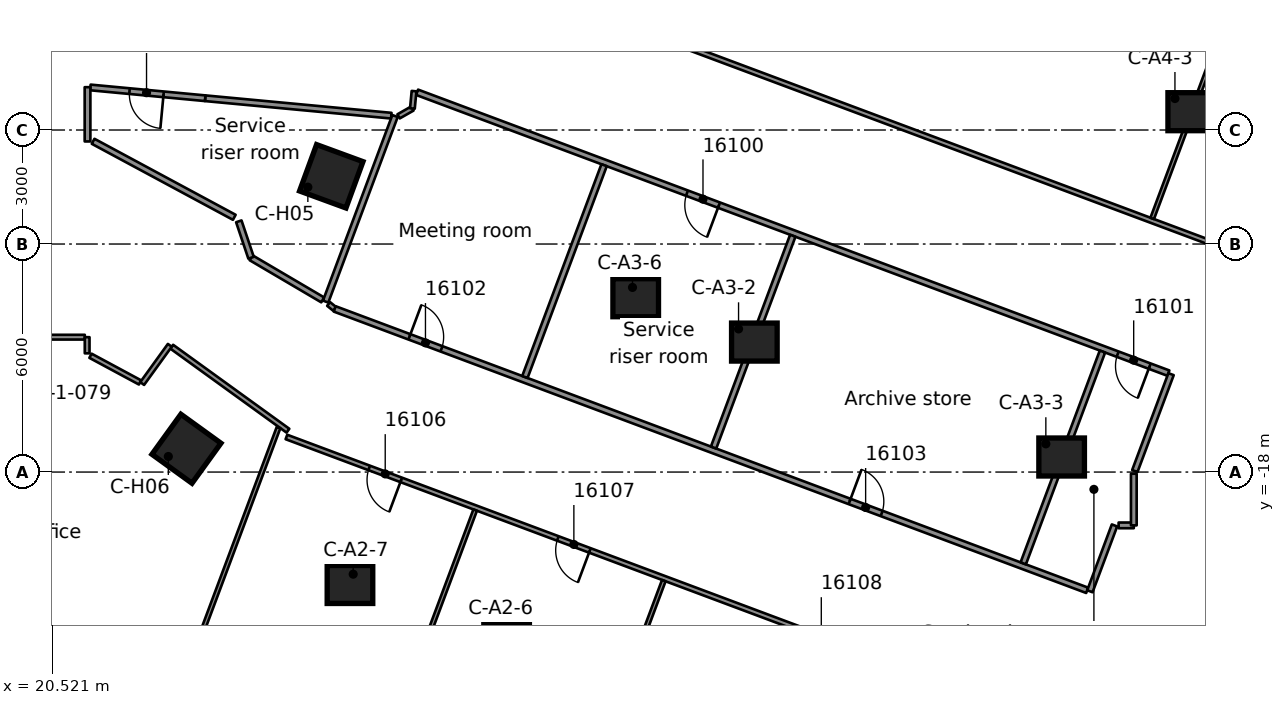
"""IFC4 building model, lengths in metres.
Left out: names, types, materials, properties, quantities, classifications, styles, units other than length and angle.
Written with IfcOpenShell. Run it as: python <this file> out.ifc"""

import sys

from ifc_helpers import new_model, si_unit, direction, frame, frame_2d, origin, origin_2d, place, context, subcontext, project, spatial, rectangle, extrude, element, fill, save


model = new_model("IFC4")
c1 = context("Model", 3, precision=1e-05, world=origin(), true_north=direction((0.0, 1.0)))
c2 = subcontext(c1, "Body", "Model", "MODEL_VIEW")
j1 = project(units=[si_unit("LENGTHUNIT", "METRE"), si_unit("PLANEANGLEUNIT", "RADIAN")], contexts=[c1])
p1 = place(None, origin())
s1 = spatial("IfcSite", under=j1, at=p1, CompositionType="ELEMENT")
p2 = place(p1, origin())
s2 = spatial("IfcBuilding", under=s1, at=p2, CompositionType="ELEMENT")
p3 = place(p2, frame((0.0, 0.0, 80.7)))
s3 = spatial("IfcBuildingStorey", under=s2, at=p3, CompositionType="ELEMENT", Elevation=80.7)
for number, where, z_axis, x_axis in (
    (1, (32.478, -22.499, 0.0), (0.0, 0.0, 1.0), (1.0, 0.0, 0.0)),
    (2, (28.356, -20.958, 0.0), (0.0, 0.0, 1.0), (1.0, 0.0, 0.0)),
    (3, (38.997, -14.58, 0.0), (0.0, 0.0, 1.0), (1.0, 0.0, 0.0)),
    (4, (47.083, -17.604, 0.0), (0.0, 0.0, 1.0), (1.0, 0.0, 0.0)),
    (5, (35.875, -13.413, 0.0), (0.0, 0.0, 1.0), (1.0, 0.0, 0.0)),
    (6, (50.48, -8.518, 0.0), (0.0, 0.0, 1.0), (1.0, 0.0, 0.0)),
):
    element("IfcColumn", number, at=place(p3, frame(where, z_axis=z_axis, x_axis=x_axis)), inside=s3, PredefinedType="COLUMN", context=c2, shape_type="SweptSolid", body=[
        extrude(rectangle(XDim=1.2, YDim=1.0, at=origin_2d()), origin(), (0.0, 0.0, 1.0), 3.5),
    ])
for number, where, z_axis, x_axis in (
    (7, (27.864, -10.218, 0.0), (0.0, 0.0, 1.0), (0.939, -0.344, 0.0)),
    (8, (24.053, -17.387, 0.0), (0.0, 0.0, 1.0), (0.81, -0.586, 0.0)),
):
    element("IfcColumn", number, at=place(p3, frame(where, z_axis=z_axis, x_axis=x_axis)), inside=s3, PredefinedType="COLUMN", context=c2, shape_type="SweptSolid", body=[
        extrude(rectangle(XDim=1.3, YDim=1.3, at=origin_2d()), origin(), (0.0, 0.0, 1.0), 3.5),
    ])
p4 = place(p3, frame((27.794, -13.578, 0.0), z_axis=(0.0, 0.0, 1.0), x_axis=(0.778431743949, -0.627729256935, 0.0)))
e9 = element("IfcWall", 9, at=p4, inside=s3, PredefinedType="PARTITIONING", context=c2, shape_type="SweptSolid", body=[
    extrude(rectangle(XDim=0.206, YDim=0.125, at=frame_2d((0.103, 0.0))), origin(), (0.0, 0.0, 1.0), 3.08),
])
p5 = place(p3, frame((27.639, -13.47, 0.0), z_axis=(0.0, 0.0, 1.0), x_axis=(-0.862037468795, 0.506844554468, 0.0)))
e10 = element("IfcWall", 10, at=p5, inside=s3, PredefinedType="PARTITIONING", context=c2, shape_type="SweptSolid", body=[
    extrude(rectangle(XDim=2.188, YDim=0.15, at=frame_2d((1.094, 0.0))), origin(), (0.0, 0.0, 1.0), 3.08),
])
p6 = place(p3, frame((23.666, -14.702, 0.0), z_axis=(0.0, 0.0, 1.0), x_axis=(0.810481264218, -0.585764560512, 0.0)))
e11 = element("IfcWall", 11, at=p6, inside=s3, PredefinedType="PARTITIONING", context=c2, shape_type="SweptSolid", body=[
    extrude(rectangle(XDim=3.773, YDim=0.125, at=frame_2d((1.887, 0.0))), origin(), (0.0, 0.0, 1.0), 3.08),
])
p7 = place(p3, frame((21.528, -14.94, 0.0), z_axis=(0.0, 0.0, 1.0), x_axis=(0.880465806507, -0.474109653532, 0.0)))
e12 = element("IfcWall", 12, at=p7, inside=s3, PredefinedType="PARTITIONING", context=c2, shape_type="SweptSolid", body=[
    extrude(rectangle(XDim=1.481, YDim=0.125, at=frame_2d((0.74, 0.0))), origin(), (0.0, 0.0, 1.0), 3.08),
])
p8 = place(p3, frame((21.597, -9.297, 0.0), z_axis=(0.0, 0.0, 1.0), x_axis=(0.880513830638, -0.474020457422, 0.0)))
e13 = element("IfcWall", 13, at=p8, inside=s3, PredefinedType="PARTITIONING", context=c2, shape_type="SweptSolid", body=[
    extrude(rectangle(XDim=4.219, YDim=0.15, at=frame_2d((2.11, 0.0))), origin(), (0.0, 0.0, 1.0), 3.08),
])
p9 = place(p3, frame((49.879, -25.749, 0.0), z_axis=(0.0, 0.0, 1.0), x_axis=(-0.936673120203, 0.350204891299, 0.0)))
e14 = element("IfcWall", 14, at=p9, inside=s3, PredefinedType="PARTITIONING", context=c2, shape_type="SweptSolid", body=[
    extrude(rectangle(XDim=24.763, YDim=0.125, at=frame_2d((12.381, 0.0))), origin(), (0.0, 0.0, 1.0), 3.08),
])
p10 = place(p9, frame((21.538, 0.0, 0.0)))
e15 = element("IfcOpeningElement", 15, at=p10, cuts=e14, PredefinedType="OPENING", context=c2, shape_type="SweptSolid", body=[
    extrude(rectangle(XDim=0.9, YDim=2.1, at=frame_2d((0.45, 1.05))), frame((0.0, 0.073, 0.0), z_axis=(0.0, -1.0, 0.0), x_axis=(1.0, 0.0, 0.0)), (0.0, 0.0, 1.0), 0.145),
])
p11 = place(p9, frame((16.238, 0.0, 0.0)))
e16 = element("IfcOpeningElement", 16, at=p11, cuts=e14, PredefinedType="OPENING", context=c2, shape_type="SweptSolid", body=[
    extrude(rectangle(XDim=0.9, YDim=2.1, at=frame_2d((0.45, 1.05))), frame((0.0, 0.073, 0.0), z_axis=(0.0, -1.0, 0.0), x_axis=(1.0, 0.0, 0.0)), (0.0, 0.0, 1.0), 0.145),
])
p12 = place(p9, frame((9.287, 0.0, 0.0)))
e17 = element("IfcOpeningElement", 17, at=p12, cuts=e14, PredefinedType="OPENING", context=c2, shape_type="SweptSolid", body=[
    extrude(rectangle(XDim=0.9, YDim=2.1, at=frame_2d((0.45, 1.05))), frame((0.0, 0.073, 0.0), z_axis=(0.0, -1.0, 0.0), x_axis=(1.0, 0.0, 0.0)), (0.0, 0.0, 1.0), 0.145),
])
p13 = place(p3, frame((27.954, -13.707, 0.0), z_axis=(0.0, 0.0, 1.0), x_axis=(0.936643936966, -0.350282936133, 0.0)))
e18 = element("IfcWall", 18, at=p13, inside=s3, PredefinedType="PARTITIONING", context=c2, shape_type="SweptSolid", body=[
    extrude(rectangle(XDim=21.14, YDim=0.15, at=frame_2d((10.57, 0.0))), origin(), (0.0, 0.0, 1.0), 3.08),
])
p14 = place(p13, frame((2.1, 0.0, 0.0)))
e19 = element("IfcOpeningElement", 19, at=p14, cuts=e18, PredefinedType="OPENING", context=c2, shape_type="SweptSolid", body=[
    extrude(rectangle(XDim=0.9, YDim=2.1, at=frame_2d((0.45, 1.05))), frame((0.0, 0.085, 0.0), z_axis=(0.0, -1.0, 0.0), x_axis=(1.0, 0.0, 0.0)), (0.0, 0.0, 1.0), 0.17),
])
p15 = place(p13, frame((14.466, 0.0, 0.0)))
e20 = element("IfcOpeningElement", 20, at=p15, cuts=e18, PredefinedType="OPENING", context=c2, shape_type="SweptSolid", body=[
    extrude(rectangle(XDim=0.9, YDim=2.1, at=frame_2d((0.45, 1.05))), frame((0.0, 0.085, 0.0), z_axis=(0.0, -1.0, 0.0), x_axis=(1.0, 0.0, 0.0)), (0.0, 0.0, 1.0), 0.17),
])
p16 = place(p3, frame((49.892, -15.397, 0.0), z_axis=(0.0, 0.0, 1.0), x_axis=(-0.936700392394, 0.35013193926, 0.0)))
e21 = element("IfcWall", 21, at=p16, inside=s3, PredefinedType="PARTITIONING", context=c2, shape_type="SweptSolid", body=[
    extrude(rectangle(XDim=21.106, YDim=0.15, at=frame_2d((10.553, 0.0))), origin(), (0.0, 0.0, 1.0), 3.08),
])
p17 = place(p16, frame((12.624, 0.0, 0.0)))
e22 = element("IfcOpeningElement", 22, at=p17, cuts=e21, PredefinedType="OPENING", context=c2, shape_type="SweptSolid", body=[
    extrude(rectangle(XDim=0.9, YDim=2.1, at=frame_2d((0.45, 1.05))), frame((0.0, 0.085, 0.0), z_axis=(0.0, -1.0, 0.0), x_axis=(1.0, 0.0, 0.0)), (0.0, 0.0, 1.0), 0.17),
])
p18 = place(p16, frame((0.525, 0.0, 0.0)))
e23 = element("IfcOpeningElement", 23, at=p18, cuts=e21, PredefinedType="OPENING", context=c2, shape_type="SweptSolid", body=[
    extrude(rectangle(XDim=0.9, YDim=2.1, at=frame_2d((0.45, 1.05))), frame((0.0, 0.085, 0.0), z_axis=(0.0, -1.0, 0.0), x_axis=(1.0, 0.0, 0.0)), (0.0, 0.0, 1.0), 0.17),
])
p19 = place(p3, frame((32.706, -5.128, 0.0), z_axis=(0.0, 0.0, 1.0), x_axis=(0.936721191538, -0.350076290718, 0.0)))
e24 = element("IfcWall", 24, at=p19, inside=s3, PredefinedType="PARTITIONING", context=c2, shape_type="SweptSolid", body=[
    extrude(rectangle(XDim=23.307, YDim=0.125, at=frame_2d((11.653, 0.0))), origin(), (0.0, 0.0, 1.0), 3.08),
])
p20 = place(p3, frame((24.547, -8.164, 0.0), z_axis=(0.0, 0.0, 1.0), x_axis=(0.995634514424, -0.093337632747, 0.0)))
e25 = element("IfcWall", 25, at=p20, inside=s3, PredefinedType="PARTITIONING", context=c2, shape_type="SweptSolid", body=[
    extrude(rectangle(XDim=4.917, YDim=0.15, at=frame_2d((2.459, 0.0))), origin(), (0.0, 0.0, 1.0), 3.08),
])
p21 = place(p3, frame((24.546, -8.164, 0.0), z_axis=(0.0, 0.0, 1.0), x_axis=(-0.995604734461, 0.093654752781, 0.0)))
e26 = element("IfcWall", 26, at=p21, inside=s3, PredefinedType="PARTITIONING", context=c2, shape_type="SweptSolid", body=[
    extrude(rectangle(XDim=3.034, YDim=0.15, at=frame_2d((1.517, 0.0))), origin(), (0.0, 0.0, 1.0), 3.08),
])
p22 = place(p21, frame((1.1, 0.0, 0.0)))
e27 = element("IfcOpeningElement", 27, at=p22, cuts=e26, PredefinedType="OPENING", context=c2, shape_type="SweptSolid", body=[
    extrude(rectangle(XDim=0.9, YDim=2.1, at=frame_2d((0.45, 1.05))), frame((0.0, 0.085, 0.0), z_axis=(0.0, -1.0, 0.0), x_axis=(1.0, 0.0, 0.0)), (0.0, 0.0, 1.0), 0.17),
])
p23 = place(p3, frame((29.635, -8.641, 0.0), z_axis=(0.0, 0.0, 1.0), x_axis=(0.869245908084, 0.494379966503, 0.0)))
e28 = element("IfcWall", 28, at=p23, inside=s3, PredefinedType="PARTITIONING", context=c2, shape_type="SweptSolid", body=[
    extrude(rectangle(XDim=0.419, YDim=0.125, at=frame_2d((0.209, 0.0))), origin(), (0.0, 0.0, 1.0), 3.08),
])
p24 = place(p3, frame((48.582, -19.403, 0.0), z_axis=(0.0, 0.0, 1.0), x_axis=(1.0, 0.0, 0.0)))
e29 = element("IfcWall", 29, at=p24, inside=s3, PredefinedType="PARTITIONING", context=c2, shape_type="SweptSolid", body=[
    extrude(rectangle(XDim=0.4, YDim=0.15, at=frame_2d((0.2, 0.0))), origin(), (0.0, 0.0, 1.0), 3.08),
])
p25 = place(p3, frame((21.378, -14.451, 0.0), z_axis=(0.0, 0.0, 1.0), x_axis=(-1.0, 0.0, 0.0)))
e30 = element("IfcWall", 30, at=p25, inside=s3, PredefinedType="PARTITIONING", context=c2, shape_type="SweptSolid", body=[
    extrude(rectangle(XDim=10.987, YDim=0.125, at=frame_2d((5.493, 0.0))), origin(), (0.0, 0.0, 1.0), 3.08),
])
p26 = place(p25, frame((7.811, 0.0, 0.0)))
e31 = element("IfcOpeningElement", 31, at=p26, cuts=e30, PredefinedType="OPENING", context=c2, shape_type="SweptSolid", body=[
    extrude(rectangle(XDim=0.9, YDim=2.1, at=frame_2d((0.45, 1.05))), frame((0.0, 0.073, 0.0), z_axis=(0.0, -1.0, 0.0), x_axis=(1.0, 0.0, 0.0)), (0.0, 0.0, 1.0), 0.145),
])
p27 = place(p25, frame((2.288, 0.0, 0.0)))
e32 = element("IfcOpeningElement", 32, at=p27, cuts=e30, PredefinedType="OPENING", context=c2, shape_type="SweptSolid", body=[
    extrude(rectangle(XDim=0.9, YDim=2.1, at=frame_2d((0.45, 1.05))), frame((0.0, 0.073, 0.0), z_axis=(0.0, -1.0, 0.0), x_axis=(1.0, 0.0, 0.0)), (0.0, 0.0, 1.0), 0.145),
])
p28 = place(p3, frame((22.888, -15.671, 0.0), z_axis=(0.0, 0.0, 1.0), x_axis=(0.585806524415, 0.810450933711, 0.0)))
e33 = element("IfcWall", 33, at=p28, inside=s3, PredefinedType="PARTITIONING", context=c2, shape_type="SweptSolid", body=[
    extrude(rectangle(XDim=1.241, YDim=0.125, at=frame_2d((0.621, 0.0))), origin(), (0.0, 0.0, 1.0), 3.08),
])
p29 = place(p3, frame((25.753, -12.361, 0.0), z_axis=(0.0, 0.0, 1.0), x_axis=(-0.31861820956, 0.94788313443, 0.0)))
e34 = element("IfcWall", 34, at=p29, inside=s3, PredefinedType="PARTITIONING", context=c2, shape_type="SweptSolid", body=[
    extrude(rectangle(XDim=1.011, YDim=0.15, at=frame_2d((0.505, 0.0))), origin(), (0.0, 0.0, 1.0), 3.08),
])
p30 = place(p3, frame((54.596, -13.313, 0.0), z_axis=(0.0, 0.0, 1.0), x_axis=(-0.35021402566, -0.936669704982, 0.0)))
e35 = element("IfcWall", 35, at=p30, inside=s3, PredefinedType="PARTITIONING", context=c2, shape_type="SweptSolid", body=[
    extrude(rectangle(XDim=13.3, YDim=0.125, at=frame_2d((6.65, 0.0))), origin(), (0.0, 0.0, 1.0), 3.08),
])
p31 = place(p30, frame((2.85, 0.0, 0.0)))
e36 = element("IfcOpeningElement", 36, at=p31, cuts=e35, PredefinedType="OPENING", context=c2, shape_type="SweptSolid", body=[
    extrude(rectangle(XDim=0.9, YDim=2.1, at=frame_2d((0.45, 1.05))), frame((0.0, 0.073, 0.0), z_axis=(0.0, -1.0, 0.0), x_axis=(1.0, 0.0, 0.0)), (0.0, 0.0, 1.0), 0.145),
])
p32 = place(p30, frame((9.5, 0.0, 0.0)))
e37 = element("IfcOpeningElement", 37, at=p32, cuts=e35, PredefinedType="OPENING", context=c2, shape_type="SweptSolid", body=[
    extrude(rectangle(XDim=0.9, YDim=2.1, at=frame_2d((0.45, 1.05))), frame((0.0, 0.073, 0.0), z_axis=(0.0, -1.0, 0.0), x_axis=(1.0, 0.0, 0.0)), (0.0, 0.0, 1.0), 0.145),
])
p33 = place(p3, frame((47.826, -21.137, 0.0), z_axis=(0.0, 0.0, 1.0), x_axis=(0.350342430847, 0.936621685179, 0.0)))
e38 = element("IfcWall", 38, at=p33, inside=s3, PredefinedType="PARTITIONING", context=c2, shape_type="SweptSolid", body=[
    extrude(rectangle(XDim=1.85, YDim=0.15, at=frame_2d((0.925, 0.0))), origin(), (0.0, 0.0, 1.0), 3.08),
])
p34 = place(p3, frame((49.009, -17.973, 0.0), z_axis=(0.0, 0.0, 1.0), x_axis=(0.350179353698, 0.936682667846, 0.0)))
e39 = element("IfcWall", 39, at=p34, inside=s3, PredefinedType="PARTITIONING", context=c2, shape_type="SweptSolid", body=[
    extrude(rectangle(XDim=2.721, YDim=0.15, at=frame_2d((1.361, 0.0))), origin(), (0.0, 0.0, 1.0), 3.08),
])
p35 = place(p3, frame((46.073, -20.402, 0.0), z_axis=(0.0, 0.0, 1.0), x_axis=(0.350255420324, 0.936654226774, 0.0)))
e40 = element("IfcWall", 40, at=p35, inside=s3, PredefinedType="PARTITIONING", context=c2, shape_type="SweptSolid", body=[
    extrude(rectangle(XDim=5.95, YDim=0.15, at=frame_2d((2.975, 0.0))), origin(), (0.0, 0.0, 1.0), 3.08),
])
p36 = place(p3, frame((49.466, -11.327, 0.0), z_axis=(0.0, 0.0, 1.0), x_axis=(0.350154846627, 0.936691829463, 0.0)))
e41 = element("IfcWall", 41, at=p36, inside=s3, PredefinedType="PARTITIONING", context=c2, shape_type="SweptSolid", body=[
    extrude(rectangle(XDim=13.482, YDim=0.1, at=frame_2d((6.741, 0.0))), origin(), (0.0, 0.0, 1.0), 3.08),
])
p37 = place(p3, frame((31.874, -33.536, 0.0), z_axis=(0.0, 0.0, 1.0), x_axis=(0.350176475244, 0.936683743953, 0.0)))
e42 = element("IfcWall", 42, at=p37, inside=s3, PredefinedType="PARTITIONING", context=c2, shape_type="SweptSolid", body=[
    extrude(rectangle(XDim=13.536, YDim=0.1, at=frame_2d((6.768, 0.0))), origin(), (0.0, 0.0, 1.0), 3.08),
])
p38 = place(p3, frame((37.924, -17.355, 0.0), z_axis=(0.0, 0.0, 1.0), x_axis=(0.350255420324, 0.936654226774, 0.0)))
e43 = element("IfcWall", 43, at=p38, inside=s3, PredefinedType="PARTITIONING", context=c2, shape_type="SweptSolid", body=[
    extrude(rectangle(XDim=5.95, YDim=0.15, at=frame_2d((2.975, 0.0))), origin(), (0.0, 0.0, 1.0), 3.08),
])
p39 = place(p3, frame((26.91, -31.68, 0.0), z_axis=(0.0, 0.0, 1.0), x_axis=(0.350176475244, 0.936683743953, 0.0)))
e44 = element("IfcWall", 44, at=p39, inside=s3, PredefinedType="PARTITIONING", context=c2, shape_type="SweptSolid", body=[
    extrude(rectangle(XDim=13.536, YDim=0.1, at=frame_2d((6.768, 0.0))), origin(), (0.0, 0.0, 1.0), 3.08),
])
p40 = place(p3, frame((32.959, -15.499, 0.0), z_axis=(0.0, 0.0, 1.0), x_axis=(0.350255420324, 0.936654226774, 0.0)))
e45 = element("IfcWall", 45, at=p40, inside=s3, PredefinedType="PARTITIONING", context=c2, shape_type="SweptSolid", body=[
    extrude(rectangle(XDim=5.95, YDim=0.15, at=frame_2d((2.975, 0.0))), origin(), (0.0, 0.0, 1.0), 3.08),
])
p41 = place(p3, frame((21.735, -29.511, 0.0), z_axis=(0.0, 0.0, 1.0), x_axis=(0.350202491623, 0.936674017394, 0.0)))
e46 = element("IfcWall", 46, at=p41, inside=s3, PredefinedType="PARTITIONING", context=c2, shape_type="SweptSolid", body=[
    extrude(rectangle(XDim=13.541, YDim=0.1, at=frame_2d((6.77, 0.0))), origin(), (0.0, 0.0, 1.0), 3.08),
])
p42 = place(p3, frame((27.716, -13.515, 0.0), z_axis=(0.0, 0.0, 1.0), x_axis=(0.350096695155, 0.936713565633, 0.0)))
e47 = element("IfcWall", 47, at=p42, inside=s3, PredefinedType="PARTITIONING", context=c2, shape_type="SweptSolid", body=[
    extrude(rectangle(XDim=5.213, YDim=0.15, at=frame_2d((2.606, 0.0))), origin(), (0.0, 0.0, 1.0), 3.08),
])
p43 = place(p3, frame((29.999, -8.434, 0.0), z_axis=(0.0, 0.0, 1.0), x_axis=(0.09360430992, 0.995609478242, 0.0)))
e48 = element("IfcWall", 48, at=p43, inside=s3, PredefinedType="PARTITIONING", context=c2, shape_type="SweptSolid", body=[
    extrude(rectangle(XDim=0.459, YDim=0.125, at=frame_2d((0.229, 0.0))), origin(), (0.0, 0.0, 1.0), 3.08),
])
p44 = place(p3, frame((48.982, -19.403, 0.0), z_axis=(0.0, 0.0, 1.0), x_axis=(0.0, 1.0, 0.0)))
e49 = element("IfcWall", 49, at=p44, inside=s3, PredefinedType="PARTITIONING", context=c2, shape_type="SweptSolid", body=[
    extrude(rectangle(XDim=1.359, YDim=0.15, at=frame_2d((0.68, 0.0))), origin(), (0.0, 0.0, 1.0), 3.08),
])
p45 = place(p3, frame((21.44, -14.876, 0.0), z_axis=(0.0, 0.0, 1.0), x_axis=(0.0, 1.0, 0.0)))
e50 = element("IfcWall", 50, at=p45, inside=s3, PredefinedType="PARTITIONING", context=c2, shape_type="SweptSolid", body=[
    extrude(rectangle(XDim=0.425, YDim=0.125, at=frame_2d((0.212, 0.0))), origin(), (0.0, 0.0, 1.0), 3.08),
])
p46 = place(p3, frame((21.45, -9.301, 0.0), z_axis=(0.0, 0.0, 1.0), x_axis=(0.0, 1.0, 0.0)))
e51 = element("IfcWall", 51, at=p46, inside=s3, PredefinedType="PARTITIONING", context=c2, shape_type="SweptSolid", body=[
    extrude(rectangle(XDim=1.428, YDim=0.15, at=frame_2d((0.714, 0.0))), origin(), (0.0, 0.0, 1.0), 3.08),
])
p47 = place(p17, origin())
e52 = element("IfcDoor", 52, at=p47, inside=s3, OperationType="SINGLE_SWING_RIGHT", PredefinedType="DOOR", context=c2, shape_type="SweptSolid", body=[
    extrude(rectangle(XDim=0.9, YDim=2.1, at=frame_2d((0.45, 1.05))), frame((0.0, 0.025, 0.0), z_axis=(0.0, -1.0, 0.0), x_axis=(1.0, 0.0, 0.0)), (0.0, 0.0, 1.0), 0.05),
])
fill(e22, e52)
p48 = place(p18, origin())
e53 = element("IfcDoor", 53, at=p48, inside=s3, OperationType="SINGLE_SWING_LEFT", PredefinedType="DOOR", context=c2, shape_type="SweptSolid", body=[
    extrude(rectangle(XDim=0.9, YDim=2.1, at=frame_2d((0.45, 1.05))), frame((0.0, 0.025, 0.0), z_axis=(0.0, -1.0, 0.0), x_axis=(1.0, 0.0, 0.0)), (0.0, 0.0, 1.0), 0.05),
])
fill(e23, e53)
p49 = place(p14, origin())
e54 = element("IfcDoor", 54, at=p49, inside=s3, OperationType="SINGLE_SWING_LEFT", PredefinedType="DOOR", context=c2, shape_type="SweptSolid", body=[
    extrude(rectangle(XDim=0.9, YDim=2.1, at=frame_2d((0.45, 1.05))), frame((0.0, 0.025, 0.0), z_axis=(0.0, -1.0, 0.0), x_axis=(1.0, 0.0, 0.0)), (0.0, 0.0, 1.0), 0.05),
])
fill(e19, e54)
p50 = place(p15, origin())
e55 = element("IfcDoor", 55, at=p50, inside=s3, OperationType="SINGLE_SWING_RIGHT", PredefinedType="DOOR", context=c2, shape_type="SweptSolid", body=[
    extrude(rectangle(XDim=0.9, YDim=2.1, at=frame_2d((0.45, 1.05))), frame((0.0, 0.025, 0.0), z_axis=(0.0, -1.0, 0.0), x_axis=(1.0, 0.0, 0.0)), (0.0, 0.0, 1.0), 0.05),
])
fill(e20, e55)
p51 = place(p10, origin())
e56 = element("IfcDoor", 56, at=p51, inside=s3, OperationType="SINGLE_SWING_RIGHT", PredefinedType="DOOR", context=c2, shape_type="SweptSolid", body=[
    extrude(rectangle(XDim=0.9, YDim=2.1, at=frame_2d((0.45, 1.05))), frame((0.0, 0.025, 0.0), z_axis=(0.0, -1.0, 0.0), x_axis=(1.0, 0.0, 0.0)), (0.0, 0.0, 1.0), 0.05),
])
fill(e15, e56)
p52 = place(p11, origin())
e57 = element("IfcDoor", 57, at=p52, inside=s3, OperationType="SINGLE_SWING_RIGHT", PredefinedType="DOOR", context=c2, shape_type="SweptSolid", body=[
    extrude(rectangle(XDim=0.9, YDim=2.1, at=frame_2d((0.45, 1.05))), frame((0.0, 0.025, 0.0), z_axis=(0.0, -1.0, 0.0), x_axis=(1.0, 0.0, 0.0)), (0.0, 0.0, 1.0), 0.05),
])
fill(e16, e57)
p53 = place(p22, origin())
e58 = element("IfcDoor", 58, at=p53, inside=s3, OperationType="SINGLE_SWING_RIGHT", PredefinedType="DOOR", context=c2, shape_type="SweptSolid", body=[
    extrude(rectangle(XDim=0.9, YDim=2.1, at=frame_2d((0.45, 1.05))), frame((0.0, 0.025, 0.0), z_axis=(0.0, -1.0, 0.0), x_axis=(1.0, 0.0, 0.0)), (0.0, 0.0, 1.0), 0.05),
])
fill(e27, e58)
save(model, sys.argv[1])
